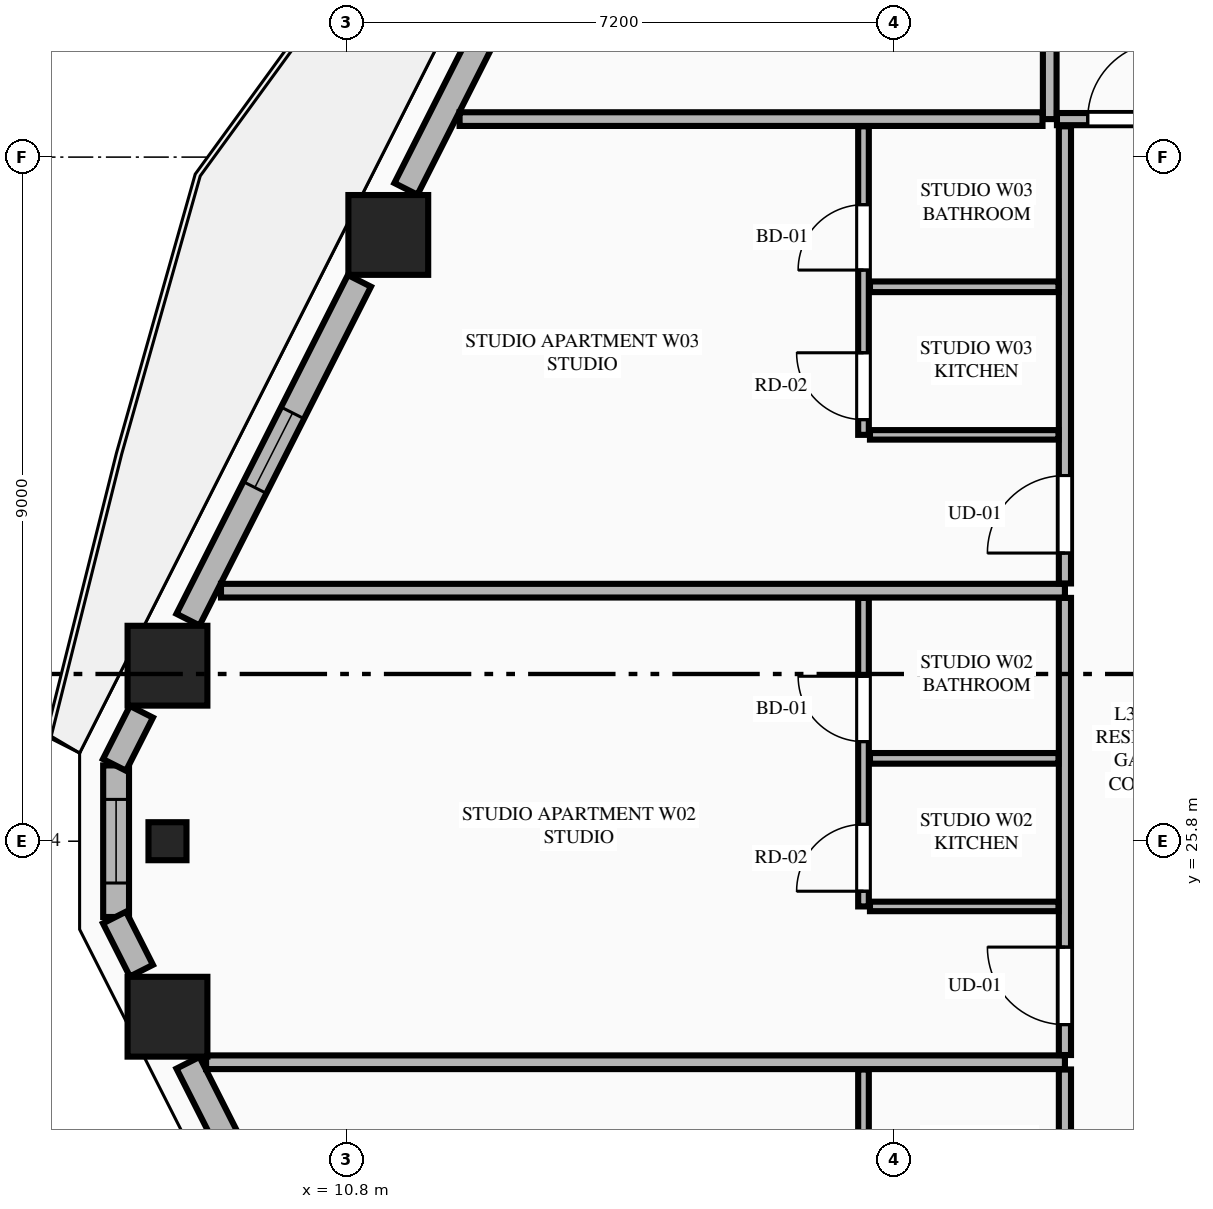
"""IFC4 building model, lengths in metres.
Left out: names, types, materials, properties, quantities, classifications, styles, units other than length and angle.
Written with IfcOpenShell. Run it as: python <this file> out.ifc"""

import sys

from ifc_helpers import new_model, si_unit, direction, frame, frame_2d, origin, origin_2d, place, context, subcontext, project, spatial, rectangle, extrude, element, fill, save


model = new_model("IFC4")
c1 = context("Model", 3, precision=1e-05, world=origin(), true_north=direction((0.0, 1.0)))
c2 = subcontext(c1, "Body", "Model", "MODEL_VIEW")
j1 = project(units=[si_unit("LENGTHUNIT", "METRE"), si_unit("PLANEANGLEUNIT", "RADIAN")], contexts=[c1])
p1 = place(None, origin())
s1 = spatial("IfcSite", under=j1, at=p1, CompositionType="ELEMENT")
p2 = place(p1, origin())
s2 = spatial("IfcBuilding", under=s1, at=p2, CompositionType="ELEMENT")
p3 = place(p2, frame((0.0, 0.0, 119.7)))
s3 = spatial("IfcBuildingStorey", under=s2, at=p3, CompositionType="ELEMENT", Elevation=119.7)
for number, where, z_axis, x_axis in (
    (1, (11.348, 33.776, 0.0), (0.0, 0.0, 1.0), (1.0, 0.0, 0.0)),
    (2, (8.443, 28.109, 0.0), (0.0, 0.0, 1.0), (1.0, 0.0, 0.0)),
    (3, (8.443, 23.491, 0.0), (0.0, 0.0, 1.0), (1.0, 0.0, 0.0)),
):
    element("IfcColumn", number, at=place(p3, frame(where, z_axis=z_axis, x_axis=x_axis)), inside=s3, PredefinedType="COLUMN", context=c2, shape_type="SweptSolid", body=[
        extrude(rectangle(XDim=1.05, YDim=1.05, at=origin_2d()), origin(), (0.0, 0.0, 1.0), 3.55),
    ])
p4 = place(p3, frame((8.443, 25.8, 0.0), z_axis=(0.0, 0.0, 1.0), x_axis=(0.0, -1.0, 0.0)))
e4 = element("IfcColumn", 4, at=p4, inside=s3, PredefinedType="PILASTER", context=c2, shape_type="SweptSolid", body=[
    extrude(rectangle(XDim=0.5, YDim=0.35, at=origin_2d()), origin(), (0.0, 0.0, 1.0), 3.55),
])
p5 = place(p3, frame((7.767, 26.797, 0.0), z_axis=(0.0, 0.0, 1.0), x_axis=(0.0, -1.0, 0.0)))
e5 = element("IfcWall", 5, at=p5, inside=s3, PredefinedType="STANDARD", context=c2, shape_type="SweptSolid", body=[
    extrude(rectangle(XDim=1.994, YDim=0.34, at=frame_2d((0.997, 0.0))), origin(), (0.0, 0.0, 1.0), 3.34),
])
p6 = place(p5, frame((0.447, 0.0, 0.75)))
e6 = element("IfcOpeningElement", 6, at=p6, cuts=e5, PredefinedType="OPENING", context=c2, shape_type="SweptSolid", body=[
    extrude(rectangle(XDim=1.1, YDim=2.0, at=frame_2d((0.55, 1.0))), frame((0.0, 0.18, 0.0), z_axis=(0.0, -1.0, 0.0), x_axis=(1.0, 0.0, 0.0)), (0.0, 0.0, 1.0), 0.36),
])
p7 = place(p3, frame((13.937, 39.039, 0.0), z_axis=(0.0, 0.0, 1.0), x_axis=(-0.451567731634, -0.892236842855, 0.0)))
e7 = element("IfcWall", 7, at=p7, inside=s3, PredefinedType="STANDARD", context=c2, shape_type="SweptSolid", body=[
    extrude(rectangle(XDim=5.219, YDim=0.34, at=frame_2d((2.61, 0.0))), origin(), (0.0, 0.0, 1.0), 2.797),
])
p8 = place(p7, frame((1.42, 0.0, 0.0)))
e8 = element("IfcOpeningElement", 8, at=p8, cuts=e7, PredefinedType="OPENING", context=c2, shape_type="SweptSolid", body=[
    extrude(rectangle(XDim=1.1, YDim=2.25, at=frame_2d((0.55, 1.125))), frame((0.0, 0.18, 0.0), z_axis=(0.0, -1.0, 0.0), x_axis=(1.0, 0.0, 0.0)), (0.0, 0.0, 1.0), 0.36),
])
p9 = place(p3, frame((10.968, 33.172, 0.0), z_axis=(0.0, 0.0, 1.0), x_axis=(-0.451470533039, -0.892286029139, 0.0)))
e9 = element("IfcWall", 9, at=p9, inside=s3, PredefinedType="STANDARD", context=c2, shape_type="SweptSolid", body=[
    extrude(rectangle(XDim=4.995, YDim=0.34, at=frame_2d((2.498, 0.0))), origin(), (0.0, 0.0, 1.0), 2.797),
])
p10 = place(p9, frame((1.947, 0.0, 0.75)))
e10 = element("IfcOpeningElement", 10, at=p10, cuts=e9, PredefinedType="OPENING", context=c2, shape_type="SweptSolid", body=[
    extrude(rectangle(XDim=1.1, YDim=1.897, at=frame_2d((0.55, 0.948))), frame((0.0, 0.18, 0.0), z_axis=(0.0, -1.0, 0.0), x_axis=(1.0, 0.0, 0.0)), (0.0, 0.0, 1.0), 0.36),
])
for number, where, z_axis, x_axis in (
    (11, (8.1, 27.503, 0.0), (0.0, 0.0, 1.0), (-0.452, -0.892, 0.0)),
    (12, (7.746, 24.796, 0.0), (0.0, 0.0, 1.0), (0.452, -0.892, 0.0)),
):
    element("IfcWall", number, at=place(p3, frame(where, z_axis=z_axis, x_axis=x_axis)), inside=s3, PredefinedType="STANDARD", context=c2, shape_type="SweptSolid", body=[
        extrude(rectangle(XDim=0.783, YDim=0.34, at=frame_2d((0.392, 0.0))), origin(), (0.0, 0.0, 1.0), 3.34),
    ])
p11 = place(p3, frame((8.713, 22.885, 0.0), z_axis=(0.0, 0.0, 1.0), x_axis=(0.451470533039, -0.892286029139, 0.0)))
e13 = element("IfcWall", 13, at=p11, inside=s3, PredefinedType="STANDARD", context=c2, shape_type="SweptSolid", body=[
    extrude(rectangle(XDim=4.995, YDim=0.34, at=frame_2d((2.498, 0.0))), origin(), (0.0, 0.0, 1.0), 2.797),
])
p12 = place(p11, frame((1.947, 0.0, 0.75)))
e14 = element("IfcOpeningElement", 14, at=p12, cuts=e13, PredefinedType="OPENING", context=c2, shape_type="SweptSolid", body=[
    extrude(rectangle(XDim=1.1, YDim=1.897, at=frame_2d((0.55, 0.948))), frame((0.0, 0.18, 0.0), z_axis=(0.0, -1.0, 0.0), x_axis=(1.0, 0.0, 0.0)), (0.0, 0.0, 1.0), 0.36),
])
p13 = place(p3, frame((20.05, 35.3, 0.0), z_axis=(0.0, 0.0, 1.0), x_axis=(0.0, 1.0, 0.0)))
e15 = element("IfcWall", 15, at=p13, inside=s3, PredefinedType="PARTITIONING", context=c2, shape_type="SweptSolid", body=[
    extrude(rectangle(XDim=12.195, YDim=0.18, at=frame_2d((6.098, 0.0))), origin(), (0.0, 0.0, 1.0), 3.34),
])
p14 = place(p3, frame((20.145, 35.3, 0.0), z_axis=(0.0, 0.0, 1.0), x_axis=(1.0, 0.0, 0.0)))
e16 = element("IfcWall", 16, at=p14, inside=s3, PredefinedType="PARTITIONING", context=c2, shape_type="SweptSolid", body=[
    extrude(rectangle(XDim=24.51, YDim=0.16, at=frame_2d((12.255, 0.0))), origin(), (0.0, 0.0, 1.0), 3.34),
])
p15 = place(p14, frame((0.405, 0.0, 0.0)))
e17 = element("IfcOpeningElement", 17, at=p15, cuts=e16, PredefinedType="OPENING", context=c2, shape_type="SweptSolid", body=[
    extrude(rectangle(XDim=1.02, YDim=2.25, at=frame_2d((0.51, 1.125))), frame((0.0, 0.09, 0.0), z_axis=(0.0, -1.0, 0.0), x_axis=(1.0, 0.0, 0.0)), (0.0, 0.0, 1.0), 0.18),
])
p16 = place(p3, frame((12.286, 35.3, 0.0), z_axis=(0.0, 0.0, 1.0), x_axis=(1.0, 0.0, 0.0)))
e18 = element("IfcWall", 18, at=p16, inside=s3, PredefinedType="PARTITIONING", context=c2, shape_type="SweptSolid", body=[
    extrude(rectangle(XDim=7.669, YDim=0.18, at=frame_2d((3.834, 0.0))), origin(), (0.0, 0.0, 1.0), 3.34),
])
p17 = place(p3, frame((20.25, 16.595, 0.0), z_axis=(0.0, 0.0, 1.0), x_axis=(0.0, 1.0, 0.0)))
e19 = element("IfcWall", 19, at=p17, inside=s3, PredefinedType="PARTITIONING", context=c2, shape_type="SweptSolid", body=[
    extrude(rectangle(XDim=6.202, YDim=0.16, at=frame_2d((3.101, 0.0))), origin(), (0.0, 0.0, 1.0), 3.34),
])
p18 = place(p17, frame((0.4, 0.0, 0.0)))
e20 = element("IfcOpeningElement", 20, at=p18, cuts=e19, PredefinedType="OPENING", context=c2, shape_type="SweptSolid", body=[
    extrude(rectangle(XDim=1.02, YDim=2.25, at=frame_2d((0.51, 1.125))), frame((0.0, 0.09, 0.0), z_axis=(0.0, -1.0, 0.0), x_axis=(1.0, 0.0, 0.0)), (0.0, 0.0, 1.0), 0.18),
])
p19 = place(p3, frame((17.6, 18.55, 0.0), z_axis=(0.0, 0.0, 1.0), x_axis=(0.0, 1.0, 0.0)))
e21 = element("IfcWall", 21, at=p19, inside=s3, PredefinedType="PLUMBINGWALL", context=c2, shape_type="SweptSolid", body=[
    extrude(rectangle(XDim=4.247, YDim=0.14, at=frame_2d((2.124, 0.0))), origin(), (0.0, 0.0, 1.0), 3.34),
])
p20 = place(p19, frame((2.259, 0.0, 0.0)))
e22 = element("IfcOpeningElement", 22, at=p20, cuts=e21, PredefinedType="OPENING", context=c2, shape_type="SweptSolid", body=[
    extrude(rectangle(XDim=0.86, YDim=2.1, at=frame_2d((0.43, 1.05))), frame((0.0, 0.08, 0.0), z_axis=(0.0, -1.0, 0.0), x_axis=(1.0, 0.0, 0.0)), (0.0, 0.0, 1.0), 0.16),
])
p21 = place(p19, frame((0.2, 0.0, 0.0)))
e23 = element("IfcOpeningElement", 23, at=p21, cuts=e21, PredefinedType="OPENING", context=c2, shape_type="SweptSolid", body=[
    extrude(rectangle(XDim=0.88, YDim=2.15, at=frame_2d((0.44, 1.075))), frame((0.0, 0.08, 0.0), z_axis=(0.0, -1.0, 0.0), x_axis=(1.0, 0.0, 0.0)), (0.0, 0.0, 1.0), 0.16),
])
p22 = place(p3, frame((8.951, 22.892, 0.0), z_axis=(0.0, 0.0, 1.0), x_axis=(1.0, 0.0, 0.0)))
e24 = element("IfcWall", 24, at=p22, inside=s3, PredefinedType="PARTITIONING", context=c2, shape_type="SweptSolid", body=[
    extrude(rectangle(XDim=11.299, YDim=0.18, at=frame_2d((5.649, 0.0))), origin(), (0.0, 0.0, 1.0), 3.34),
])
p23 = place(p3, frame((20.25, 22.987, 0.0), z_axis=(0.0, 0.0, 1.0), x_axis=(0.0, 1.0, 0.0)))
e25 = element("IfcWall", 25, at=p23, inside=s3, PredefinedType="PARTITIONING", context=c2, shape_type="SweptSolid", body=[
    extrude(rectangle(XDim=6.014, YDim=0.16, at=frame_2d((3.007, 0.0))), origin(), (0.0, 0.0, 1.0), 3.34),
])
p24 = place(p23, frame((0.4, 0.0, 0.0)))
e26 = element("IfcOpeningElement", 26, at=p24, cuts=e25, PredefinedType="OPENING", context=c2, shape_type="SweptSolid", body=[
    extrude(rectangle(XDim=1.02, YDim=2.25, at=frame_2d((0.51, 1.125))), frame((0.0, 0.09, 0.0), z_axis=(0.0, -1.0, 0.0), x_axis=(1.0, 0.0, 0.0)), (0.0, 0.0, 1.0), 0.18),
])
p25 = place(p3, frame((17.685, 24.942, 0.0), z_axis=(0.0, 0.0, 1.0), x_axis=(1.0, 0.0, 0.0)))
e27 = element("IfcWall", 27, at=p25, inside=s3, PredefinedType="PARTITIONING", context=c2, shape_type="SweptSolid", body=[
    extrude(rectangle(XDim=2.48, YDim=0.125, at=frame_2d((1.24, 0.0))), origin(), (0.0, 0.0, 1.0), 3.34),
])
p26 = place(p3, frame((17.6, 24.942, 0.0), z_axis=(0.0, 0.0, 1.0), x_axis=(0.0, 1.0, 0.0)))
e28 = element("IfcWall", 28, at=p26, inside=s3, PredefinedType="PLUMBINGWALL", context=c2, shape_type="SweptSolid", body=[
    extrude(rectangle(XDim=4.059, YDim=0.14, at=frame_2d((2.03, 0.0))), origin(), (0.0, 0.0, 1.0), 3.34),
])
p27 = place(p26, frame((2.168, 0.0, 0.0)))
e29 = element("IfcOpeningElement", 29, at=p27, cuts=e28, PredefinedType="OPENING", context=c2, shape_type="SweptSolid", body=[
    extrude(rectangle(XDim=0.86, YDim=2.1, at=frame_2d((0.43, 1.05))), frame((0.0, 0.08, 0.0), z_axis=(0.0, -1.0, 0.0), x_axis=(1.0, 0.0, 0.0)), (0.0, 0.0, 1.0), 0.16),
])
p28 = place(p26, frame((0.2, 0.0, 0.0)))
e30 = element("IfcOpeningElement", 30, at=p28, cuts=e28, PredefinedType="OPENING", context=c2, shape_type="SweptSolid", body=[
    extrude(rectangle(XDim=0.88, YDim=2.15, at=frame_2d((0.44, 1.075))), frame((0.0, 0.08, 0.0), z_axis=(0.0, -1.0, 0.0), x_axis=(1.0, 0.0, 0.0)), (0.0, 0.0, 1.0), 0.16),
])
p29 = place(p3, frame((17.685, 26.89, 0.0), z_axis=(0.0, 0.0, 1.0), x_axis=(1.0, 0.0, 0.0)))
e31 = element("IfcWall", 31, at=p29, inside=s3, PredefinedType="PLUMBINGWALL", context=c2, shape_type="SweptSolid", body=[
    extrude(rectangle(XDim=2.48, YDim=0.14, at=frame_2d((1.24, 0.0))), origin(), (0.0, 0.0, 1.0), 3.34),
])
p30 = place(p3, frame((9.147, 29.096, 0.0), z_axis=(0.0, 0.0, 1.0), x_axis=(1.0, 0.0, 0.0)))
e32 = element("IfcWall", 32, at=p30, inside=s3, PredefinedType="PARTITIONING", context=c2, shape_type="SweptSolid", body=[
    extrude(rectangle(XDim=11.103, YDim=0.18, at=frame_2d((5.552, 0.0))), origin(), (0.0, 0.0, 1.0), 3.34),
])
p31 = place(p3, frame((20.25, 29.191, 0.0), z_axis=(0.0, 0.0, 1.0), x_axis=(0.0, 1.0, 0.0)))
e33 = element("IfcWall", 33, at=p31, inside=s3, PredefinedType="PARTITIONING", context=c2, shape_type="SweptSolid", body=[
    extrude(rectangle(XDim=6.014, YDim=0.16, at=frame_2d((3.007, 0.0))), origin(), (0.0, 0.0, 1.0), 3.34),
])
p32 = place(p31, frame((0.4, 0.0, 0.0)))
e34 = element("IfcOpeningElement", 34, at=p32, cuts=e33, PredefinedType="OPENING", context=c2, shape_type="SweptSolid", body=[
    extrude(rectangle(XDim=1.02, YDim=2.25, at=frame_2d((0.51, 1.125))), frame((0.0, 0.09, 0.0), z_axis=(0.0, -1.0, 0.0), x_axis=(1.0, 0.0, 0.0)), (0.0, 0.0, 1.0), 0.18),
])
p33 = place(p3, frame((17.685, 31.146, 0.0), z_axis=(0.0, 0.0, 1.0), x_axis=(1.0, 0.0, 0.0)))
e35 = element("IfcWall", 35, at=p33, inside=s3, PredefinedType="PARTITIONING", context=c2, shape_type="SweptSolid", body=[
    extrude(rectangle(XDim=2.48, YDim=0.125, at=frame_2d((1.24, 0.0))), origin(), (0.0, 0.0, 1.0), 3.34),
])
p34 = place(p3, frame((17.6, 31.146, 0.0), z_axis=(0.0, 0.0, 1.0), x_axis=(0.0, 1.0, 0.0)))
e36 = element("IfcWall", 36, at=p34, inside=s3, PredefinedType="PLUMBINGWALL", context=c2, shape_type="SweptSolid", body=[
    extrude(rectangle(XDim=4.059, YDim=0.14, at=frame_2d((2.03, 0.0))), origin(), (0.0, 0.0, 1.0), 3.34),
])
p35 = place(p34, frame((2.168, 0.0, 0.0)))
e37 = element("IfcOpeningElement", 37, at=p35, cuts=e36, PredefinedType="OPENING", context=c2, shape_type="SweptSolid", body=[
    extrude(rectangle(XDim=0.86, YDim=2.1, at=frame_2d((0.43, 1.05))), frame((0.0, 0.08, 0.0), z_axis=(0.0, -1.0, 0.0), x_axis=(1.0, 0.0, 0.0)), (0.0, 0.0, 1.0), 0.16),
])
p36 = place(p34, frame((0.2, 0.0, 0.0)))
e38 = element("IfcOpeningElement", 38, at=p36, cuts=e36, PredefinedType="OPENING", context=c2, shape_type="SweptSolid", body=[
    extrude(rectangle(XDim=0.88, YDim=2.15, at=frame_2d((0.44, 1.075))), frame((0.0, 0.08, 0.0), z_axis=(0.0, -1.0, 0.0), x_axis=(1.0, 0.0, 0.0)), (0.0, 0.0, 1.0), 0.16),
])
p37 = place(p3, frame((17.685, 33.094, 0.0), z_axis=(0.0, 0.0, 1.0), x_axis=(1.0, 0.0, 0.0)))
e39 = element("IfcWall", 39, at=p37, inside=s3, PredefinedType="PLUMBINGWALL", context=c2, shape_type="SweptSolid", body=[
    extrude(rectangle(XDim=2.48, YDim=0.14, at=frame_2d((1.24, 0.0))), origin(), (0.0, 0.0, 1.0), 3.34),
])
p38 = place(p10, origin())
e40 = element("IfcWindow", 40, at=p38, inside=s3, PartitioningType="SINGLE_PANEL", PredefinedType="WINDOW", context=c2, shape_type="SweptSolid", body=[
    extrude(rectangle(XDim=1.1, YDim=1.897, at=frame_2d((0.55, 0.948))), frame((0.0, 0.03, 0.0), z_axis=(0.0, -1.0, 0.0), x_axis=(1.0, 0.0, 0.0)), (0.0, 0.0, 1.0), 0.06),
])
fill(e10, e40)
p39 = place(p15, origin())
e41 = element("IfcDoor", 41, at=p39, inside=s3, OperationType="SINGLE_SWING_RIGHT", PredefinedType="DOOR", context=c2, shape_type="SweptSolid", body=[
    extrude(rectangle(XDim=1.02, YDim=2.25, at=frame_2d((0.51, 1.125))), frame((0.0, 0.025, 0.0), z_axis=(0.0, -1.0, 0.0), x_axis=(1.0, 0.0, 0.0)), (0.0, 0.0, 1.0), 0.05),
])
fill(e17, e41)
p40 = place(p27, origin())
e42 = element("IfcDoor", 42, at=p40, inside=s3, OperationType="SINGLE_SWING_RIGHT", PredefinedType="DOOR", context=c2, shape_type="SweptSolid", body=[
    extrude(rectangle(XDim=0.86, YDim=2.1, at=frame_2d((0.43, 1.05))), frame((0.0, 0.025, 0.0), z_axis=(0.0, -1.0, 0.0), x_axis=(1.0, 0.0, 0.0)), (0.0, 0.0, 1.0), 0.05),
])
fill(e29, e42)
p41 = place(p24, origin())
e43 = element("IfcDoor", 43, at=p41, inside=s3, OperationType="SINGLE_SWING_RIGHT", PredefinedType="DOOR", context=c2, shape_type="SweptSolid", body=[
    extrude(rectangle(XDim=1.02, YDim=2.25, at=frame_2d((0.51, 1.125))), frame((0.0, 0.025, 0.0), z_axis=(0.0, -1.0, 0.0), x_axis=(1.0, 0.0, 0.0)), (0.0, 0.0, 1.0), 0.05),
])
fill(e26, e43)
p42 = place(p28, origin())
e44 = element("IfcDoor", 44, at=p42, inside=s3, OperationType="SINGLE_SWING_LEFT", PredefinedType="DOOR", context=c2, shape_type="SweptSolid", body=[
    extrude(rectangle(XDim=0.88, YDim=2.15, at=frame_2d((0.44, 1.075))), frame((0.0, 0.025, 0.0), z_axis=(0.0, -1.0, 0.0), x_axis=(1.0, 0.0, 0.0)), (0.0, 0.0, 1.0), 0.05),
])
fill(e30, e44)
p43 = place(p35, origin())
e45 = element("IfcDoor", 45, at=p43, inside=s3, OperationType="SINGLE_SWING_LEFT", PredefinedType="DOOR", context=c2, shape_type="SweptSolid", body=[
    extrude(rectangle(XDim=0.86, YDim=2.1, at=frame_2d((0.43, 1.05))), frame((0.0, 0.025, 0.0), z_axis=(0.0, -1.0, 0.0), x_axis=(1.0, 0.0, 0.0)), (0.0, 0.0, 1.0), 0.05),
])
fill(e37, e45)
p44 = place(p32, origin())
e46 = element("IfcDoor", 46, at=p44, inside=s3, OperationType="SINGLE_SWING_LEFT", PredefinedType="DOOR", context=c2, shape_type="SweptSolid", body=[
    extrude(rectangle(XDim=1.02, YDim=2.25, at=frame_2d((0.51, 1.125))), frame((0.0, 0.025, 0.0), z_axis=(0.0, -1.0, 0.0), x_axis=(1.0, 0.0, 0.0)), (0.0, 0.0, 1.0), 0.05),
])
fill(e34, e46)
p45 = place(p36, origin())
e47 = element("IfcDoor", 47, at=p45, inside=s3, OperationType="SINGLE_SWING_RIGHT", PredefinedType="DOOR", context=c2, shape_type="SweptSolid", body=[
    extrude(rectangle(XDim=0.88, YDim=2.15, at=frame_2d((0.44, 1.075))), frame((0.0, 0.025, 0.0), z_axis=(0.0, -1.0, 0.0), x_axis=(1.0, 0.0, 0.0)), (0.0, 0.0, 1.0), 0.05),
])
fill(e38, e47)
p46 = place(p6, origin())
e48 = element("IfcWindow", 48, at=p46, inside=s3, PartitioningType="SINGLE_PANEL", PredefinedType="WINDOW", context=c2, shape_type="SweptSolid", body=[
    extrude(rectangle(XDim=1.1, YDim=2.0, at=frame_2d((0.55, 1.0))), frame((0.0, 0.03, 0.0), z_axis=(0.0, -1.0, 0.0), x_axis=(1.0, 0.0, 0.0)), (0.0, 0.0, 1.0), 0.06),
])
fill(e6, e48)
save(model, sys.argv[1])
